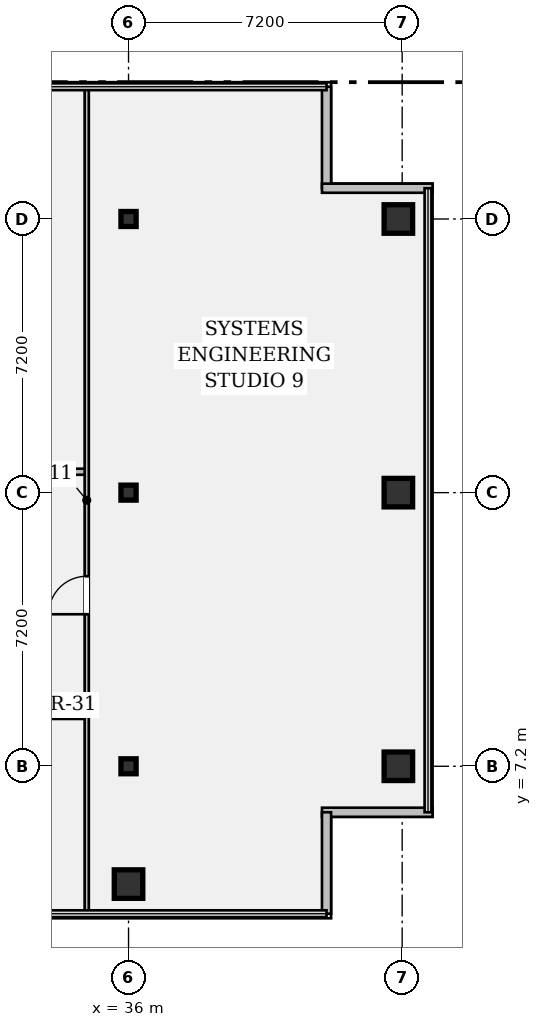
"""IFC4 building model, lengths in metres.
Left out: names, types, materials, properties, quantities, classifications, styles, units other than length and angle.
Written with IfcOpenShell. Run it as: python <this file> out.ifc"""

import sys

from ifc_helpers import new_model, si_unit, direction, frame, frame_2d, origin, origin_2d, place, context, subcontext, project, spatial, rectangle, hollow_rectangle, i_section, extrude, element, fill, save


model = new_model("IFC4")
c1 = context("Model", 3, precision=1e-05, world=origin(), true_north=direction((0.0, 1.0)))
c2 = subcontext(c1, "Body", "Model", "MODEL_VIEW")
j1 = project(units=[si_unit("LENGTHUNIT", "METRE"), si_unit("PLANEANGLEUNIT", "RADIAN")], contexts=[c1])
p1 = place(None, origin())
s1 = spatial("IfcSite", under=j1, at=p1, CompositionType="ELEMENT")
p2 = place(p1, origin())
s2 = spatial("IfcBuilding", under=s1, at=p2, CompositionType="ELEMENT")
p3 = place(p2, frame((0.0, 0.0, 222.25)))
s3 = spatial("IfcBuildingStorey", under=s2, at=p3, CompositionType="ELEMENT", Elevation=222.25)
p4 = place(p3, frame((36.0, 4.1, 0.0), z_axis=(0.0, 0.0, 1.0), x_axis=(1.0, 0.0, 0.0)))
e1 = element("IfcColumn", 1, at=p4, inside=s3, PredefinedType="COLUMN", context=c2, shape_type="SweptSolid", body=[
    extrude(hollow_rectangle(XDim=0.75, YDim=0.75, WallThickness=0.045, at=origin_2d()), origin(), (0.0, 0.0, 1.0), 3.24),
])
for number, where, z_axis, x_axis in (
    (2, (36.0, 7.2, 0.0), (0.0, 0.0, 1.0), (1.0, 0.0, 0.0)),
    (3, (36.0, 14.4, 0.0), (0.0, 0.0, 1.0), (1.0, 0.0, 0.0)),
    (4, (36.0, 21.6, 0.0), (0.0, 0.0, 1.0), (1.0, 0.0, 0.0)),
):
    element("IfcColumn", number, at=place(p3, frame(where, z_axis=z_axis, x_axis=x_axis)), inside=s3, PredefinedType="COLUMN", context=c2, shape_type="SweptSolid", body=[
        extrude(i_section(OverallWidth=0.399, OverallDepth=0.394, WebThickness=0.023, FlangeThickness=0.037, FilletRadius=0.018, at=origin_2d()), origin(), (0.0, 0.0, 1.0), 3.24),
    ])
for number, where, z_axis, x_axis in (
    (5, (43.1, 7.2, 0.0), (0.0, 0.0, 1.0), (1.0, 0.0, 0.0)),
    (6, (43.1, 14.4, 0.0), (0.0, 0.0, 1.0), (1.0, 0.0, 0.0)),
    (7, (43.1, 21.6, 0.0), (0.0, 0.0, 1.0), (1.0, 0.0, 0.0)),
):
    element("IfcColumn", number, at=place(p3, frame(where, z_axis=z_axis, x_axis=x_axis)), inside=s3, PredefinedType="COLUMN", context=c2, shape_type="SweptSolid", body=[
        extrude(hollow_rectangle(XDim=0.75, YDim=0.75, WallThickness=0.045, at=origin_2d()), origin(), (0.0, 0.0, 1.0), 3.24),
    ])
p5 = place(p3, frame((41.21, 25.08, 0.0), z_axis=(0.0, 0.0, 1.0), x_axis=(0.0, -1.0, 0.0)))
e8 = element("IfcWall", 8, at=p5, inside=s3, PredefinedType="STANDARD", context=c2, shape_type="SweptSolid", body=[
    extrude(rectangle(XDim=2.67, YDim=0.24, at=frame_2d((1.335, 0.0))), origin(), (0.0, 0.0, 1.0), 3.24),
])
for number, where, z_axis, x_axis in (
    (9, (41.09, 22.41, 0.0), (0.0, 0.0, 1.0), (1.0, 0.0, 0.0)),
    (10, (44.0, 5.99, 0.0), (0.0, 0.0, 1.0), (-1.0, 0.0, 0.0)),
):
    element("IfcWall", number, at=place(p3, frame(where, z_axis=z_axis, x_axis=x_axis)), inside=s3, PredefinedType="STANDARD", context=c2, shape_type="SweptSolid", body=[
        extrude(rectangle(XDim=2.91, YDim=0.24, at=frame_2d((1.455, 0.0))), origin(), (0.0, 0.0, 1.0), 3.24),
    ])
p6 = place(p3, frame((41.21, 5.99, 0.0), z_axis=(0.0, 0.0, 1.0), x_axis=(0.0, -1.0, 0.0)))
e11 = element("IfcWall", 11, at=p6, inside=s3, PredefinedType="STANDARD", context=c2, shape_type="SweptSolid", body=[
    extrude(rectangle(XDim=2.67, YDim=0.24, at=frame_2d((1.335, 0.0))), origin(), (0.0, 0.0, 1.0), 3.24),
])
p7 = place(p3, frame((32.95, 8.5, 0.0), z_axis=(0.0, 0.0, 1.0), x_axis=(1.0, 0.0, 0.0)))
e12 = element("IfcWall", 12, at=p7, inside=s3, PredefinedType="PARTITIONING", context=c2, shape_type="SweptSolid", body=[
    extrude(rectangle(XDim=1.95, YDim=0.11, at=frame_2d((0.975, 0.0))), origin(), (0.0, 0.0, 1.0), 2.808),
])
p8 = place(p3, frame((32.95, 14.95, 0.0), z_axis=(0.0, 0.0, 1.0), x_axis=(1.0, 0.0, 0.0)))
e13 = element("IfcWall", 13, at=p8, inside=s3, PredefinedType="PARTITIONING", context=c2, shape_type="SweptSolid", body=[
    extrude(rectangle(XDim=1.95, YDim=0.16, at=frame_2d((0.975, 0.0))), origin(), (0.0, 0.0, 1.0), 2.808),
])
p9 = place(p3, frame((34.9, 3.32, 0.0), z_axis=(0.0, 0.0, 1.0), x_axis=(0.0, 1.0, 0.0)))
e14 = element("IfcWall", 14, at=p9, inside=s3, PredefinedType="PARTITIONING", context=c2, shape_type="SweptSolid", body=[
    extrude(rectangle(XDim=21.76, YDim=0.11, at=frame_2d((10.88, 0.0))), origin(), (0.0, 0.0, 1.0), 2.613),
])
p10 = place(p9, frame((7.88, 0.0, 0.0)))
e15 = element("IfcOpeningElement", 15, at=p10, cuts=e14, PredefinedType="OPENING", context=c2, shape_type="SweptSolid", body=[
    extrude(rectangle(XDim=1.0, YDim=2.15, at=frame_2d((0.5, 1.075))), frame((0.0, 0.067, 0.0), z_axis=(0.0, -1.0, 0.0), x_axis=(1.0, 0.0, 0.0)), (0.0, 0.0, 1.0), 0.134),
])
p11 = place(p10, origin())
e16 = element("IfcDoor", 16, at=p11, inside=s3, OperationType="SINGLE_SWING_LEFT", PredefinedType="DOOR", context=c2, shape_type="SweptSolid", body=[
    extrude(rectangle(XDim=1.0, YDim=2.15, at=frame_2d((0.5, 1.075))), frame((0.0, 0.025, 0.0), z_axis=(0.0, -1.0, 0.0), x_axis=(1.0, 0.0, 0.0)), (0.0, 0.0, 1.0), 0.05),
])
fill(e15, e16)
save(model, sys.argv[1])
